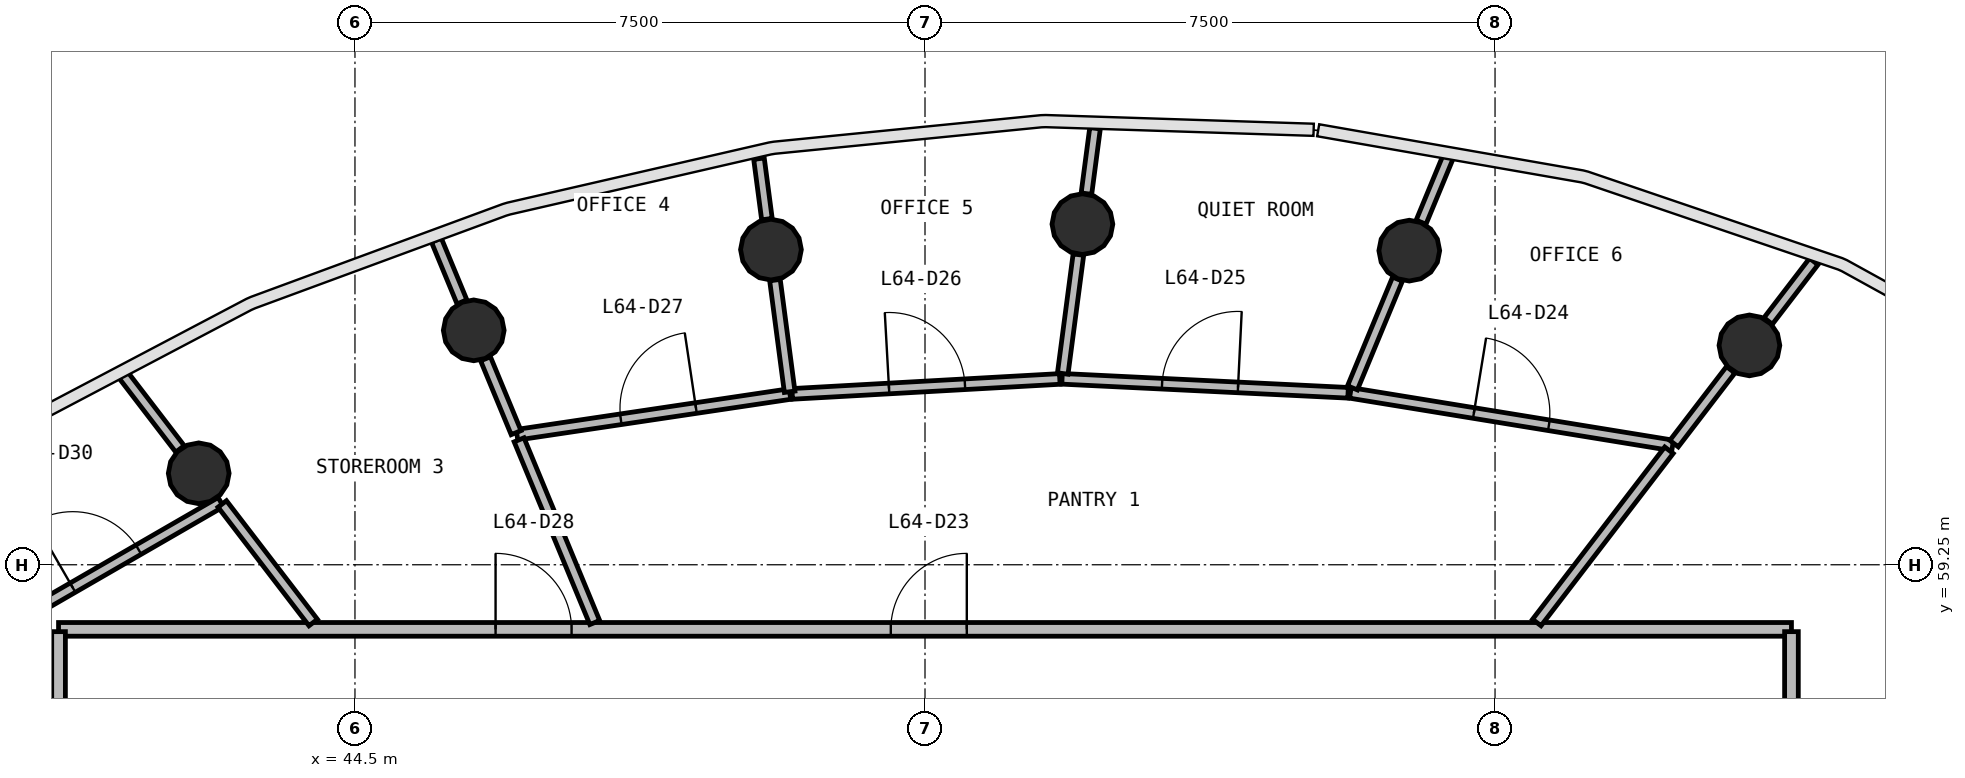
"""IFC4 building model, lengths in metres.
Left out: names, types, materials, properties, quantities, classifications, styles, units other than length and angle.
Written with IfcOpenShell. Run it as: python <this file> out.ifc"""

import sys

from ifc_helpers import new_model, si_unit, direction, frame, frame_2d, origin, origin_2d, place, context, subcontext, project, spatial, rectangle, circle, extrude, source, transform, mapped, element, fill, save


model = new_model("IFC4")
c1 = context("Model", 3, precision=1e-05, world=origin(), true_north=direction((0.0, 1.0)))
c2 = subcontext(c1, "Body", "Model", "MODEL_VIEW")
j1 = project(units=[si_unit("LENGTHUNIT", "METRE"), si_unit("PLANEANGLEUNIT", "RADIAN")], contexts=[c1])
p1 = place(None, origin())
s1 = spatial("IfcSite", under=j1, at=p1, CompositionType="ELEMENT")
p2 = place(p1, origin())
s2 = spatial("IfcBuilding", under=s1, at=p2, CompositionType="ELEMENT")
p3 = place(p2, frame((0.0, 0.0, 261.8)))
s3 = spatial("IfcBuildingStorey", under=s2, at=p3, CompositionType="ELEMENT", Elevation=261.8)
m1 = source(origin(), c2, "Body", "SweptSolid", [
    extrude(circle(Radius=0.4, at=origin_2d()), origin(), (0.0, 0.0, 1.0), 3.9),
])
for number, where, z_axis, x_axis in (
    (1, (62.847, 62.136, 0.0), (0.0, 0.0, 1.0), (1.0, 0.0, 0.0)),
    (2, (58.372, 63.383, 0.0), (0.0, 0.0, 1.0), (1.0, 0.0, 0.0)),
    (3, (54.071, 63.731, 0.0), (0.0, 0.0, 1.0), (1.0, 0.0, 0.0)),
    (4, (49.973, 63.396, 0.0), (0.0, 0.0, 1.0), (1.0, 0.0, 0.0)),
    (5, (46.063, 62.334, 0.0), (0.0, 0.0, 1.0), (1.0, 0.0, 0.0)),
    (6, (42.444, 60.453, 0.0), (0.0, 0.0, 1.0), (1.0, 0.0, 0.0)),
):
    element("IfcColumn", number, at=place(p3, frame(where, z_axis=z_axis, x_axis=x_axis)), inside=s3, PredefinedType="COLUMN", context=c2, shape_type="MappedRepresentation", body=[
        mapped(m1, transform((0.0, 0.0, 0.0), scale=1.0)),
    ])
p4 = place(p3, frame((40.6, 58.4, 0.0), z_axis=(0.0, 0.0, 1.0), x_axis=(1.0, 0.0, 0.0)))
e7 = element("IfcWall", 7, at=p4, inside=s3, PredefinedType="PARTITIONING", context=c2, shape_type="SweptSolid", body=[
    extrude(rectangle(XDim=22.8, YDim=0.18, at=frame_2d((11.4, 0.0))), origin(), (0.0, 0.0, 1.0), 2.75),
])
p5 = place(p4, frame((10.95, 0.0, 0.0)))
e8 = element("IfcOpeningElement", 8, at=p5, cuts=e7, PredefinedType="OPENING", context=c2, shape_type="SweptSolid", body=[
    extrude(rectangle(XDim=1.0, YDim=2.1, at=frame_2d((0.5, 1.05))), frame((0.0, 0.1, 0.0), z_axis=(0.0, -1.0, 0.0), x_axis=(1.0, 0.0, 0.0)), (0.0, 0.0, 1.0), 0.2),
])
p6 = place(p4, frame((5.75, 0.0, 0.0)))
e9 = element("IfcOpeningElement", 9, at=p6, cuts=e7, PredefinedType="OPENING", context=c2, shape_type="SweptSolid", body=[
    extrude(rectangle(XDim=1.0, YDim=2.1, at=frame_2d((0.5, 1.05))), frame((0.0, 0.1, 0.0), z_axis=(0.0, -1.0, 0.0), x_axis=(1.0, 0.0, 0.0)), (0.0, 0.0, 1.0), 0.2),
])
p7 = place(p3, frame((63.4, 58.37, 0.0), z_axis=(0.0, 0.0, 1.0), x_axis=(0.0, -1.0, 0.0)))
e10 = element("IfcWall", 10, at=p7, inside=s3, PredefinedType="PARTITIONING", context=c2, shape_type="SweptSolid", body=[
    extrude(rectangle(XDim=20.74, YDim=0.18, at=frame_2d((10.37, 0.0))), origin(), (0.0, 0.0, 1.0), 2.75),
])
p8 = place(p7, frame((9.99, 0.0, 0.0)))
e11 = element("IfcOpeningElement", 11, at=p8, cuts=e10, PredefinedType="OPENING", context=c2, shape_type="SweptSolid", body=[
    extrude(rectangle(XDim=0.9, YDim=2.1, at=frame_2d((0.45, 1.05))), frame((0.0, 0.1, 0.0), z_axis=(0.0, -1.0, 0.0), x_axis=(1.0, 0.0, 0.0)), (0.0, 0.0, 1.0), 0.2),
])
p9 = place(p7, frame((7.79, 0.0, 0.0)))
e12 = element("IfcOpeningElement", 12, at=p9, cuts=e10, PredefinedType="OPENING", context=c2, shape_type="SweptSolid", body=[
    extrude(rectangle(XDim=0.9, YDim=2.1, at=frame_2d((0.45, 1.05))), frame((0.0, 0.1, 0.0), z_axis=(0.0, -1.0, 0.0), x_axis=(1.0, 0.0, 0.0)), (0.0, 0.0, 1.0), 0.2),
])
p10 = place(p7, frame((4.29, 0.0, 0.0)))
e13 = element("IfcOpeningElement", 13, at=p10, cuts=e10, PredefinedType="OPENING", context=c2, shape_type="SweptSolid", body=[
    extrude(rectangle(XDim=1.0, YDim=2.1, at=frame_2d((0.5, 1.05))), frame((0.0, 0.1, 0.0), z_axis=(0.0, -1.0, 0.0), x_axis=(1.0, 0.0, 0.0)), (0.0, 0.0, 1.0), 0.2),
])
p11 = place(p7, frame((12.09, 0.0, 0.0)))
e14 = element("IfcOpeningElement", 14, at=p11, cuts=e10, PredefinedType="OPENING", context=c2, shape_type="SweptSolid", body=[
    extrude(rectangle(XDim=1.0, YDim=2.1, at=frame_2d((0.5, 1.05))), frame((0.0, 0.1, 0.0), z_axis=(0.0, -1.0, 0.0), x_axis=(1.0, 0.0, 0.0)), (0.0, 0.0, 1.0), 0.2),
])
p12 = place(p3, frame((40.6, 37.63, 0.0), z_axis=(0.0, 0.0, 1.0), x_axis=(0.0, 1.0, 0.0)))
e15 = element("IfcWall", 15, at=p12, inside=s3, PredefinedType="PARTITIONING", context=c2, shape_type="SweptSolid", body=[
    extrude(rectangle(XDim=20.74, YDim=0.18, at=frame_2d((10.37, 0.0))), origin(), (0.0, 0.0, 1.0), 2.75),
])
p13 = place(p12, frame((15.49, 0.0, 0.0)))
e16 = element("IfcOpeningElement", 16, at=p13, cuts=e15, PredefinedType="OPENING", context=c2, shape_type="SweptSolid", body=[
    extrude(rectangle(XDim=1.0, YDim=2.1, at=frame_2d((0.5, 1.05))), frame((0.0, 0.1, 0.0), z_axis=(0.0, -1.0, 0.0), x_axis=(1.0, 0.0, 0.0)), (0.0, 0.0, 1.0), 0.2),
])
p14 = place(p12, frame((9.89, 0.0, 0.0)))
e17 = element("IfcOpeningElement", 17, at=p14, cuts=e15, PredefinedType="OPENING", context=c2, shape_type="SweptSolid", body=[
    extrude(rectangle(XDim=1.0, YDim=2.1, at=frame_2d((0.5, 1.05))), frame((0.0, 0.1, 0.0), z_axis=(0.0, -1.0, 0.0), x_axis=(1.0, 0.0, 0.0)), (0.0, 0.0, 1.0), 0.2),
])
p15 = place(p12, frame((7.69, 0.0, 0.0)))
e18 = element("IfcOpeningElement", 18, at=p15, cuts=e15, PredefinedType="OPENING", context=c2, shape_type="SweptSolid", body=[
    extrude(rectangle(XDim=1.0, YDim=2.1, at=frame_2d((0.5, 1.05))), frame((0.0, 0.1, 0.0), z_axis=(0.0, -1.0, 0.0), x_axis=(1.0, 0.0, 0.0)), (0.0, 0.0, 1.0), 0.2),
])
p16 = place(p3, frame((57.596, 61.511, 0.0), z_axis=(0.0, 0.0, 1.0), x_axis=(0.986966791607, -0.160924057449, 0.0)))
e19 = element("IfcWall", 19, at=p16, inside=s3, PredefinedType="PARTITIONING", context=c2, shape_type="SweptSolid", body=[
    extrude(rectangle(XDim=4.296, YDim=0.14, at=frame_2d((2.148, 0.0))), origin(), (0.0, 0.0, 1.0), 2.75),
])
p17 = place(p16, frame((1.646, 0.0, 0.0)))
e20 = element("IfcOpeningElement", 20, at=p17, cuts=e19, PredefinedType="OPENING", context=c2, shape_type="SweptSolid", body=[
    extrude(rectangle(XDim=1.0, YDim=2.1, at=frame_2d((0.5, 1.05))), frame((0.0, 0.08, 0.0), z_axis=(0.0, -1.0, 0.0), x_axis=(1.0, 0.0, 0.0)), (0.0, 0.0, 1.0), 0.16),
])
p18 = place(p3, frame((39.395, 58.145, 0.0), z_axis=(0.0, 0.0, 1.0), x_axis=(0.865963153708, 0.500107804798, 0.0)))
e21 = element("IfcWall", 21, at=p18, inside=s3, PredefinedType="PARTITIONING", context=c2, shape_type="SweptSolid", body=[
    extrude(rectangle(XDim=3.857, YDim=0.14, at=frame_2d((1.929, 0.0))), origin(), (0.0, 0.0, 1.0), 2.75),
])
p19 = place(p18, frame((1.607, 0.0, 0.0)))
e22 = element("IfcOpeningElement", 22, at=p19, cuts=e21, PredefinedType="OPENING", context=c2, shape_type="SweptSolid", body=[
    extrude(rectangle(XDim=1.0, YDim=2.1, at=frame_2d((0.5, 1.05))), frame((0.0, 0.08, 0.0), z_axis=(0.0, -1.0, 0.0), x_axis=(1.0, 0.0, 0.0)), (0.0, 0.0, 1.0), 0.16),
])
p20 = place(p3, frame((53.803, 61.696, 0.0), z_axis=(0.0, 0.0, 1.0), x_axis=(0.998808887541, -0.048793505405, 0.0)))
e23 = element("IfcWall", 23, at=p20, inside=s3, PredefinedType="PARTITIONING", context=c2, shape_type="SweptSolid", body=[
    extrude(rectangle(XDim=3.768, YDim=0.14, at=frame_2d((1.884, 0.0))), origin(), (0.0, 0.0, 1.0), 2.75),
])
p21 = place(p20, frame((1.318, 0.0, 0.0)))
e24 = element("IfcOpeningElement", 24, at=p21, cuts=e23, PredefinedType="OPENING", context=c2, shape_type="SweptSolid", body=[
    extrude(rectangle(XDim=1.0, YDim=2.1, at=frame_2d((0.5, 1.05))), frame((0.0, 0.08, 0.0), z_axis=(0.0, -1.0, 0.0), x_axis=(1.0, 0.0, 0.0)), (0.0, 0.0, 1.0), 0.16),
])
p22 = place(p3, frame((46.632, 60.96, 0.0), z_axis=(0.0, 0.0, 1.0), x_axis=(0.989060769931, 0.147508621387, 0.0)))
e25 = element("IfcWall", 25, at=p22, inside=s3, PredefinedType="PARTITIONING", context=c2, shape_type="SweptSolid", body=[
    extrude(rectangle(XDim=3.631, YDim=0.14, at=frame_2d((1.816, 0.0))), origin(), (0.0, 0.0, 1.0), 2.75),
])
p23 = place(p22, frame((1.381, 0.0, 0.0)))
e26 = element("IfcOpeningElement", 26, at=p23, cuts=e25, PredefinedType="OPENING", context=c2, shape_type="SweptSolid", body=[
    extrude(rectangle(XDim=1.0, YDim=2.1, at=frame_2d((0.5, 1.05))), frame((0.0, 0.08, 0.0), z_axis=(0.0, -1.0, 0.0), x_axis=(1.0, 0.0, 0.0)), (0.0, 0.0, 1.0), 0.16),
])
p24 = place(p3, frame((50.253, 61.498, 0.0), z_axis=(0.0, 0.0, 1.0), x_axis=(0.998441116718, 0.055815199062, 0.0)))
e27 = element("IfcWall", 27, at=p24, inside=s3, PredefinedType="PARTITIONING", context=c2, shape_type="SweptSolid", body=[
    extrude(rectangle(XDim=3.526, YDim=0.14, at=frame_2d((1.763, 0.0))), origin(), (0.0, 0.0, 1.0), 2.75),
])
p25 = place(p24, frame((1.276, 0.0, 0.0)))
e28 = element("IfcOpeningElement", 28, at=p25, cuts=e27, PredefinedType="OPENING", context=c2, shape_type="SweptSolid", body=[
    extrude(rectangle(XDim=1.0, YDim=2.1, at=frame_2d((0.5, 1.05))), frame((0.0, 0.08, 0.0), z_axis=(0.0, -1.0, 0.0), x_axis=(1.0, 0.0, 0.0)), (0.0, 0.0, 1.0), 0.16),
])
p26 = place(p3, frame((60.049, 58.49, 0.0), z_axis=(0.0, 0.0, 1.0), x_axis=(0.608768756855, 0.793347717383, 0.0)))
e29 = element("IfcWall", 29, at=p26, inside=s3, PredefinedType="PARTITIONING", context=c2, shape_type="SweptSolid", body=[
    extrude(rectangle(XDim=2.857, YDim=0.14, at=frame_2d((1.428, 0.0))), origin(), (0.0, 0.0, 1.0), 2.75),
])
p27 = place(p3, frame((47.655, 58.49, 0.0), z_axis=(0.0, 0.0, 1.0), x_axis=(-0.382655661324, 0.923891035164, 0.0)))
e30 = element("IfcWall", 30, at=p27, inside=s3, PredefinedType="PARTITIONING", context=c2, shape_type="SweptSolid", body=[
    extrude(rectangle(XDim=2.602, YDim=0.14, at=frame_2d((1.301, 0.0))), origin(), (0.0, 0.0, 1.0), 2.75),
])
p28 = place(p3, frame((43.951, 58.49, 0.0), z_axis=(0.0, 0.0, 1.0), x_axis=(-0.608744279495, 0.793366499281, 0.0)))
e31 = element("IfcWall", 31, at=p28, inside=s3, PredefinedType="PARTITIONING", context=c2, shape_type="SweptSolid", body=[
    extrude(rectangle(XDim=1.966, YDim=0.14, at=frame_2d((0.983, 0.0))), origin(), (0.0, 0.0, 1.0), 2.75),
])
p29 = place(p3, frame((53.812, 61.766, 0.0), z_axis=(0.0, 0.0, 1.0), x_axis=(0.13060261722, 0.991434796835, 0.0)))
e32 = element("IfcWall", 32, at=p29, inside=s3, PredefinedType="PARTITIONING", context=c2, shape_type="SweptSolid", body=[
    extrude(rectangle(XDim=1.578, YDim=0.14, at=frame_2d((0.789, 0.0))), origin(), (0.0, 0.0, 1.0), 2.75),
])
p30 = place(p3, frame((57.624, 61.577, 0.0), z_axis=(0.0, 0.0, 1.0), x_axis=(0.382857557741, 0.923807388193, 0.0)))
e33 = element("IfcWall", 33, at=p30, inside=s3, PredefinedType="PARTITIONING", context=c2, shape_type="SweptSolid", body=[
    extrude(rectangle(XDim=1.549, YDim=0.14, at=frame_2d((0.774, 0.0))), origin(), (0.0, 0.0, 1.0), 2.75),
])
p31 = place(p3, frame((50.219, 61.526, 0.0), z_axis=(0.0, 0.0, 1.0), x_axis=(-0.130480082608, 0.991450930729, 0.0)))
e34 = element("IfcWall", 34, at=p31, inside=s3, PredefinedType="PARTITIONING", context=c2, shape_type="SweptSolid", body=[
    extrude(rectangle(XDim=1.482, YDim=0.14, at=frame_2d((0.741, 0.0))), origin(), (0.0, 0.0, 1.0), 2.75),
])
p32 = place(p3, frame((61.855, 60.844, 0.0), z_axis=(0.0, 0.0, 1.0), x_axis=(0.608737071452, 0.793372029908, 0.0)))
e35 = element("IfcWall", 35, at=p32, inside=s3, PredefinedType="PARTITIONING", context=c2, shape_type="SweptSolid", body=[
    extrude(rectangle(XDim=1.224, YDim=0.14, at=frame_2d((0.612, 0.0))), origin(), (0.0, 0.0, 1.0), 2.75),
])
p33 = place(p3, frame((42.198, 60.774, 0.0), z_axis=(0.0, 0.0, 1.0), x_axis=(-0.608748904101, 0.793362950834, 0.0)))
e36 = element("IfcWall", 36, at=p33, inside=s3, PredefinedType="PARTITIONING", context=c2, shape_type="SweptSolid", body=[
    extrude(rectangle(XDim=1.227, YDim=0.14, at=frame_2d((0.614, 0.0))), origin(), (0.0, 0.0, 1.0), 2.75),
])
p34 = place(p3, frame((46.62, 60.988, 0.0), z_axis=(0.0, 0.0, 1.0), x_axis=(-0.382570490689, 0.923926306398, 0.0)))
e37 = element("IfcWall", 37, at=p34, inside=s3, PredefinedType="PARTITIONING", context=c2, shape_type="SweptSolid", body=[
    extrude(rectangle(XDim=1.052, YDim=0.14, at=frame_2d((0.526, 0.0))), origin(), (0.0, 0.0, 1.0), 2.75),
])
p35 = place(p3, frame((63.093, 62.457, 0.0), z_axis=(0.0, 0.0, 1.0), x_axis=(0.608597799138, 0.793478871101, 0.0)))
e38 = element("IfcWall", 38, at=p35, inside=s3, PredefinedType="PARTITIONING", context=c2, shape_type="SweptSolid", body=[
    extrude(rectangle(XDim=0.986, YDim=0.14, at=frame_2d((0.493, 0.0))), origin(), (0.0, 0.0, 1.0), 2.75),
])
p36 = place(p3, frame((58.527, 63.757, 0.0), z_axis=(0.0, 0.0, 1.0), x_axis=(0.382781658682, 0.923838839721, 0.0)))
e39 = element("IfcWall", 39, at=p36, inside=s3, PredefinedType="PARTITIONING", context=c2, shape_type="SweptSolid", body=[
    extrude(rectangle(XDim=0.936, YDim=0.14, at=frame_2d((0.468, 0.0))), origin(), (0.0, 0.0, 1.0), 2.75),
])
p37 = place(p3, frame((45.908, 62.708, 0.0), z_axis=(0.0, 0.0, 1.0), x_axis=(-0.382801251463, 0.923830721441, 0.0)))
e40 = element("IfcWall", 40, at=p37, inside=s3, PredefinedType="PARTITIONING", context=c2, shape_type="SweptSolid", body=[
    extrude(rectangle(XDim=0.879, YDim=0.14, at=frame_2d((0.44, 0.0))), origin(), (0.0, 0.0, 1.0), 2.75),
])
p38 = place(p3, frame((54.124, 64.132, 0.0), z_axis=(0.0, 0.0, 1.0), x_axis=(0.130541844348, 0.991442800606, 0.0)))
e41 = element("IfcWall", 41, at=p38, inside=s3, PredefinedType="PARTITIONING", context=c2, shape_type="SweptSolid", body=[
    extrude(rectangle(XDim=0.868, YDim=0.14, at=frame_2d((0.434, 0.0))), origin(), (0.0, 0.0, 1.0), 2.75),
])
p39 = place(p3, frame((49.92, 63.797, 0.0), z_axis=(0.0, 0.0, 1.0), x_axis=(-0.130588373578, 0.991436673059, 0.0)))
e42 = element("IfcWall", 42, at=p39, inside=s3, PredefinedType="PARTITIONING", context=c2, shape_type="SweptSolid", body=[
    extrude(rectangle(XDim=0.802, YDim=0.14, at=frame_2d((0.401, 0.0))), origin(), (0.0, 0.0, 1.0), 2.75),
])
m2 = source(origin(), c2, "Body", "SweptSolid", [
    extrude(rectangle(XDim=1.0, YDim=2.1, at=frame_2d((0.5, 1.05))), frame((0.0, 0.025, 0.0), z_axis=(0.0, -1.0, 0.0), x_axis=(1.0, 0.0, 0.0)), (0.0, 0.0, 1.0), 0.05),
])
p40 = place(p5, origin())
e43 = element("IfcDoor", 43, at=p40, inside=s3, OperationType="SINGLE_SWING_RIGHT", PredefinedType="DOOR", context=c2, shape_type="MappedRepresentation", body=[
    mapped(m2, transform((0.0, 0.0, 0.0), scale=1.0)),
])
fill(e8, e43)
p41 = place(p17, origin())
e44 = element("IfcDoor", 44, at=p41, inside=s3, OperationType="SINGLE_SWING_LEFT", PredefinedType="DOOR", context=c2, shape_type="MappedRepresentation", body=[
    mapped(m2, transform((0.0, 0.0, 0.0), scale=1.0)),
])
fill(e20, e44)
p42 = place(p21, origin())
e45 = element("IfcDoor", 45, at=p42, inside=s3, OperationType="SINGLE_SWING_RIGHT", PredefinedType="DOOR", context=c2, shape_type="MappedRepresentation", body=[
    mapped(m2, transform((0.0, 0.0, 0.0), scale=1.0)),
])
fill(e24, e45)
p43 = place(p25, origin())
e46 = element("IfcDoor", 46, at=p43, inside=s3, OperationType="SINGLE_SWING_LEFT", PredefinedType="DOOR", context=c2, shape_type="MappedRepresentation", body=[
    mapped(m2, transform((0.0, 0.0, 0.0), scale=1.0)),
])
fill(e28, e46)
p44 = place(p23, origin())
e47 = element("IfcDoor", 47, at=p44, inside=s3, OperationType="SINGLE_SWING_RIGHT", PredefinedType="DOOR", context=c2, shape_type="MappedRepresentation", body=[
    mapped(m2, transform((0.0, 0.0, 0.0), scale=1.0)),
])
fill(e26, e47)
p45 = place(p6, origin())
e48 = element("IfcDoor", 48, at=p45, inside=s3, OperationType="SINGLE_SWING_LEFT", PredefinedType="DOOR", context=c2, shape_type="MappedRepresentation", body=[
    mapped(m2, transform((0.0, 0.0, 0.0), scale=1.0)),
])
fill(e9, e48)
p46 = place(p19, origin())
e49 = element("IfcDoor", 49, at=p46, inside=s3, OperationType="SINGLE_SWING_LEFT", PredefinedType="DOOR", context=c2, shape_type="MappedRepresentation", body=[
    mapped(m2, transform((0.0, 0.0, 0.0), scale=1.0)),
])
fill(e22, e49)
save(model, sys.argv[1])
